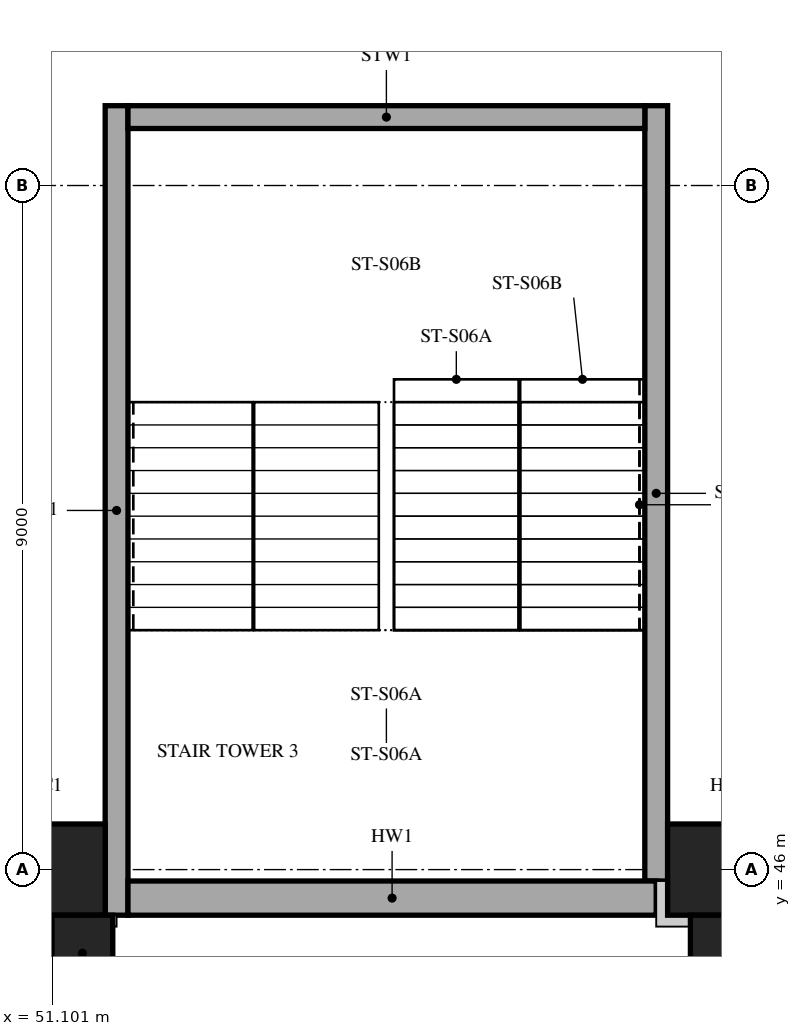
"""IFC4 building model, lengths in metres.
Left out: names, types, materials, properties, quantities, classifications, styles, units other than length and angle.
Written with IfcOpenShell. Run it as: python <this file> out.ifc"""

import sys

from ifc_helpers import new_model, si_unit, direction, frame, frame_2d, origin, origin_2d, place, context, subcontext, project, spatial, rectangle, extrude, element, save


model = new_model("IFC4")
c1 = context("Model", 3, precision=1e-05, world=origin(), true_north=direction((0.0, 1.0)))
c2 = subcontext(c1, "Body", "Model", "MODEL_VIEW")
j1 = project(units=[si_unit("LENGTHUNIT", "METRE"), si_unit("PLANEANGLEUNIT", "RADIAN")], contexts=[c1])
p1 = place(None, origin())
s1 = spatial("IfcSite", under=j1, at=p1, CompositionType="ELEMENT")
p2 = place(p1, origin())
s2 = spatial("IfcBuilding", under=s1, at=p2, CompositionType="ELEMENT")
p3 = place(p2, frame((0.0, 0.0, 5.0)))
s3 = spatial("IfcBuildingStorey", under=s2, at=p3, CompositionType="ELEMENT", Elevation=5.0)
for number, where, z_axis, x_axis in (
    (1, (51.0, 46.0, 0.0), (0.0, 0.0, 1.0), (1.0, 0.0, 0.0)),
    (2, (60.0, 46.0, 0.0), (0.0, 0.0, 1.0), (1.0, 0.0, 0.0)),
):
    element("IfcColumn", number, at=place(p3, frame(where, z_axis=z_axis, x_axis=x_axis)), inside=s3, PredefinedType="COLUMN", context=c2, shape_type="SweptSolid", body=[
        extrude(rectangle(XDim=1.6, YDim=1.2, at=origin_2d()), origin(), (0.0, 0.0, 1.0), 5.0),
    ])
p4 = place(p3, frame((51.95, 45.4, 0.0), z_axis=(0.0, 0.0, 1.0), x_axis=(0.0, 1.0, 0.0)))
e3 = element("IfcWall", 3, at=p4, inside=s3, PredefinedType="SHEAR", context=c2, shape_type="SweptSolid", body=[
    extrude(rectangle(XDim=10.65, YDim=0.3, at=frame_2d((5.325, 0.0))), origin(), (0.0, 0.0, 1.0), 5.0),
])
p5 = place(p3, frame((59.05, 45.85, 0.0), z_axis=(0.0, 0.0, 1.0), x_axis=(0.0, 1.0, 0.0)))
e4 = element("IfcWall", 4, at=p5, inside=s3, PredefinedType="SHEAR", context=c2, shape_type="SweptSolid", body=[
    extrude(rectangle(XDim=10.2, YDim=0.3, at=frame_2d((5.1, 0.0))), origin(), (0.0, 0.0, 1.0), 5.0),
])
p6 = place(p3, frame((52.1, 55.9, 0.0), z_axis=(0.0, 0.0, 1.0), x_axis=(1.0, 0.0, 0.0)))
e5 = element("IfcWall", 5, at=p6, inside=s3, PredefinedType="SHEAR", context=c2, shape_type="SweptSolid", body=[
    extrude(rectangle(XDim=6.8, YDim=0.3, at=frame_2d((3.4, 0.0))), origin(), (0.0, 0.0, 1.0), 5.0),
])
p7 = place(p3, frame((51.5, 44.9, 0.0), z_axis=(0.0, 0.0, 1.0), x_axis=(1.0, 0.0, 0.0)))
e6 = element("IfcColumn", 6, at=p7, inside=s3, PredefinedType="COLUMN", context=c2, shape_type="SweptSolid", body=[
    extrude(rectangle(XDim=0.8, YDim=1.0, at=origin_2d()), origin(), (0.0, 0.0, 1.0), 5.0),
])
p8 = place(p3, frame((60.0, 44.9, 0.0), z_axis=(0.0, 0.0, 1.0), x_axis=(1.0, 0.0, 0.0)))
e7 = element("IfcColumn", 7, at=p8, inside=s3, PredefinedType="COLUMN", context=c2, shape_type="SweptSolid", body=[
    extrude(rectangle(XDim=1.0, YDim=1.0, at=origin_2d()), origin(), (0.0, 0.0, 1.0), 5.0),
])
p9 = place(p3, frame((52.1, 45.625, 0.0), z_axis=(0.0, 0.0, 1.0), x_axis=(1.0, 0.0, 0.0)))
e8 = element("IfcWall", 8, at=p9, inside=s3, PredefinedType="SOLIDWALL", context=c2, shape_type="SweptSolid", body=[
    extrude(rectangle(XDim=6.95, YDim=0.45, at=frame_2d((3.475, 0.0))), origin(), (0.0, 0.0, 1.0), 5.0),
])
save(model, sys.argv[1])
